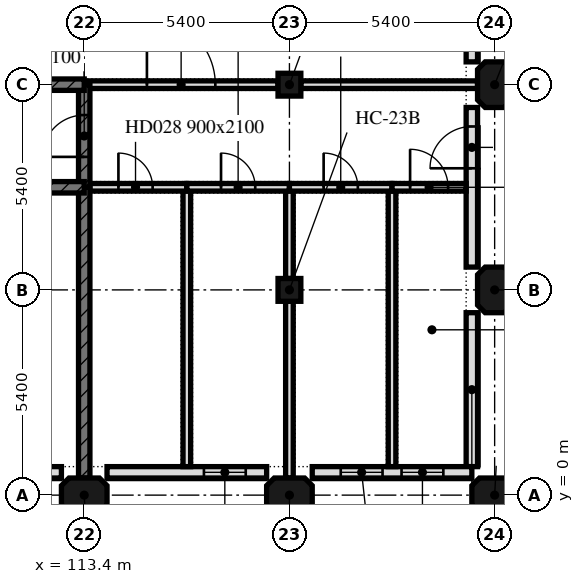
"""IFC4 building model, lengths in metres.
Left out: names, types, materials, properties, quantities, classifications, styles, units other than length and angle.
Written with IfcOpenShell. Run it as: python <this file> out.ifc"""

import sys

from ifc_helpers import new_model, si_unit, direction, frame, frame_2d, origin, origin_2d, place, context, subcontext, project, spatial, polyline, rectangle, outline, extrude, element, fill, save


model = new_model("IFC4")
c1 = context("Model", 3, precision=1e-05, world=origin(), true_north=direction((0.0, 1.0)))
c2 = subcontext(c1, "Body", "Model", "MODEL_VIEW")
j1 = project(units=[si_unit("LENGTHUNIT", "METRE"), si_unit("PLANEANGLEUNIT", "RADIAN")], contexts=[c1])
p1 = place(None, origin())
s1 = spatial("IfcSite", under=j1, at=p1, CompositionType="ELEMENT")
p2 = place(p1, origin())
s2 = spatial("IfcBuilding", under=s1, at=p2, CompositionType="ELEMENT")
p3 = place(p2, origin())
s3 = spatial("IfcBuildingStorey", under=s2, at=p3, CompositionType="ELEMENT", Elevation=0.0)
for number, where, z_axis, x_axis in (
    (1, (113.4, 0.0, -0.4), (0.0, 0.0, 1.0), (1.0, 0.0, 0.0)),
    (2, (118.8, 0.0, -0.4), (0.0, 0.0, 1.0), (1.0, 0.0, 0.0)),
):
    element("IfcColumn", number, at=place(p3, frame(where, z_axis=z_axis, x_axis=x_axis)), inside=s3, PredefinedType="COLUMN", context=c2, shape_type="SweptSolid", body=[
        extrude(outline(polyline([(-0.4, -0.45), (0.4, -0.45), (0.6, -0.25), (0.6, 0.25), (0.4, 0.45), (-0.4, 0.45), (-0.6, 0.25), (-0.6, -0.25), (-0.4, -0.45)])), origin(), (0.0, 0.0, 1.0), 8.5),
    ])
for number, where, z_axis, x_axis in (
    (3, (118.8, 5.4, -0.4), (0.0, 0.0, 1.0), (1.0, 0.0, 0.0)),
    (4, (118.8, 10.8, -0.4), (0.0, 0.0, 1.0), (1.0, 0.0, 0.0)),
):
    element("IfcColumn", number, at=place(p3, frame(where, z_axis=z_axis, x_axis=x_axis)), inside=s3, PredefinedType="COLUMN", context=c2, shape_type="SweptSolid", body=[
        extrude(rectangle(XDim=0.6, YDim=0.6, at=origin_2d()), origin(), (0.0, 0.0, 1.0), 8.5),
    ])
for number, where, z_axis, x_axis in (
    (5, (124.2, 0.0, -0.4), (0.0, 0.0, 1.0), (1.0, 0.0, 0.0)),
    (6, (124.2, 5.4, -0.4), (0.0, 0.0, 1.0), (0.0, 1.0, 0.0)),
    (7, (124.2, 10.8, -0.4), (0.0, 0.0, 1.0), (0.0, 1.0, 0.0)),
):
    element("IfcColumn", number, at=place(p3, frame(where, z_axis=z_axis, x_axis=x_axis)), inside=s3, PredefinedType="COLUMN", context=c2, shape_type="SweptSolid", body=[
        extrude(outline(polyline([(-0.4, -0.45), (0.4, -0.45), (0.6, -0.25), (0.6, 0.25), (0.4, 0.45), (-0.4, 0.45), (-0.6, 0.25), (-0.6, -0.25), (-0.4, -0.45)])), origin(), (0.0, 0.0, 1.0), 8.5),
    ])
p4 = place(p3, frame((108.6, 0.6, 0.0), z_axis=(0.0, 0.0, 1.0), x_axis=(1.0, 0.0, 0.0)))
e8 = element("IfcWall", 8, at=p4, inside=s3, PredefinedType="SOLIDWALL", context=c2, shape_type="SweptSolid", body=[
    extrude(rectangle(XDim=4.2, YDim=0.3, at=frame_2d((2.1, 0.0))), origin(), (0.0, 0.0, 1.0), 8.1),
])
p5 = place(p3, frame((114.0, 0.6, 0.0), z_axis=(0.0, 0.0, 1.0), x_axis=(1.0, 0.0, 0.0)))
e9 = element("IfcWall", 9, at=p5, inside=s3, PredefinedType="SOLIDWALL", context=c2, shape_type="SweptSolid", body=[
    extrude(rectangle(XDim=4.2, YDim=0.3, at=frame_2d((2.1, 0.0))), origin(), (0.0, 0.0, 1.0), 8.1),
])
p6 = place(p5, frame((2.55, 0.0, 0.9)))
e10 = element("IfcOpeningElement", 10, at=p6, cuts=e9, PredefinedType="OPENING", context=c2, shape_type="SweptSolid", body=[
    extrude(rectangle(XDim=1.1, YDim=1.7, at=frame_2d((0.55, 0.85))), frame((0.0, 0.15, 0.0), z_axis=(0.0, -1.0, 0.0), x_axis=(1.0, 0.0, 0.0)), (0.0, 0.0, 1.0), 0.3),
])
p7 = place(p3, frame((119.4, 0.6, 0.0), z_axis=(0.0, 0.0, 1.0), x_axis=(1.0, 0.0, 0.0)))
e11 = element("IfcWall", 11, at=p7, inside=s3, PredefinedType="SOLIDWALL", context=c2, shape_type="SweptSolid", body=[
    extrude(rectangle(XDim=4.2, YDim=0.3, at=frame_2d((2.1, 0.0))), origin(), (0.0, 0.0, 1.0), 8.1),
])
p8 = place(p7, frame((0.75, 0.0, 0.9)))
e12 = element("IfcOpeningElement", 12, at=p8, cuts=e11, PredefinedType="OPENING", context=c2, shape_type="SweptSolid", body=[
    extrude(rectangle(XDim=1.1, YDim=1.7, at=frame_2d((0.55, 0.85))), frame((0.0, 0.15, 0.0), z_axis=(0.0, -1.0, 0.0), x_axis=(1.0, 0.0, 0.0)), (0.0, 0.0, 1.0), 0.3),
])
p9 = place(p7, frame((2.35, 0.0, 0.9)))
e13 = element("IfcOpeningElement", 13, at=p9, cuts=e11, PredefinedType="OPENING", context=c2, shape_type="SweptSolid", body=[
    extrude(rectangle(XDim=1.1, YDim=1.7, at=frame_2d((0.55, 0.85))), frame((0.0, 0.15, 0.0), z_axis=(0.0, -1.0, 0.0), x_axis=(1.0, 0.0, 0.0)), (0.0, 0.0, 1.0), 0.3),
])
p10 = place(p3, frame((123.6, 0.75, 0.0), z_axis=(0.0, 0.0, 1.0), x_axis=(0.0, 1.0, 0.0)))
e14 = element("IfcWall", 14, at=p10, inside=s3, PredefinedType="SOLIDWALL", context=c2, shape_type="SweptSolid", body=[
    extrude(rectangle(XDim=4.05, YDim=0.3, at=frame_2d((2.025, 0.0))), origin(), (0.0, 0.0, 1.0), 8.1),
])
p11 = place(p3, frame((123.6, 6.0, 0.0), z_axis=(0.0, 0.0, 1.0), x_axis=(0.0, 1.0, 0.0)))
e15 = element("IfcWall", 15, at=p11, inside=s3, PredefinedType="SOLIDWALL", context=c2, shape_type="SweptSolid", body=[
    extrude(rectangle(XDim=4.2, YDim=0.3, at=frame_2d((2.1, 0.0))), origin(), (0.0, 0.0, 1.0), 8.1),
])
p12 = place(p11, frame((2.6, 0.0, 0.0)))
e16 = element("IfcOpeningElement", 16, at=p12, cuts=e15, PredefinedType="OPENING", context=c2, shape_type="SweptSolid", body=[
    extrude(rectangle(XDim=1.1, YDim=2.1, at=frame_2d((0.55, 1.05))), frame((0.0, 0.15, 0.0), z_axis=(0.0, -1.0, 0.0), x_axis=(1.0, 0.0, 0.0)), (0.0, 0.0, 1.0), 0.3),
])
p13 = place(p3, frame((123.6, 11.4, 0.0), z_axis=(0.0, 0.0, 1.0), x_axis=(0.0, 1.0, 0.0)))
e17 = element("IfcWall", 17, at=p13, inside=s3, PredefinedType="SOLIDWALL", context=c2, shape_type="SweptSolid", body=[
    extrude(rectangle(XDim=4.2, YDim=0.3, at=frame_2d((2.1, 0.0))), origin(), (0.0, 0.0, 1.0), 8.4),
])
p14 = place(p3, frame((116.1, 0.75, 0.0), z_axis=(0.0, 0.0, 1.0), x_axis=(0.0, 1.0, 0.0)))
e18 = element("IfcWall", 18, at=p14, inside=s3, PredefinedType="PARTITIONING", context=c2, shape_type="SweptSolid", body=[
    extrude(rectangle(XDim=7.35, YDim=0.2, at=frame_2d((3.675, 0.0))), origin(), (0.0, 0.0, 1.0), 8.1),
])
p15 = place(p3, frame((113.4, 8.1, 0.0), z_axis=(0.0, 0.0, 1.0), x_axis=(1.0, 0.0, 0.0)))
e19 = element("IfcWall", 19, at=p15, inside=s3, PredefinedType="PARTITIONING", context=c2, shape_type="SweptSolid", body=[
    extrude(rectangle(XDim=2.7, YDim=0.2, at=frame_2d((1.35, 0.0))), origin(), (0.0, 0.0, 1.0), 8.1),
])
p16 = place(p15, frame((0.9, 0.0, 0.0)))
e20 = element("IfcOpeningElement", 20, at=p16, cuts=e19, PredefinedType="OPENING", context=c2, shape_type="SweptSolid", body=[
    extrude(rectangle(XDim=0.9, YDim=2.1, at=frame_2d((0.45, 1.05))), frame((0.0, 0.1, 0.0), z_axis=(0.0, -1.0, 0.0), x_axis=(1.0, 0.0, 0.0)), (0.0, 0.0, 1.0), 0.2),
])
p17 = place(p3, frame((113.4, 0.45, 0.0), z_axis=(0.0, 0.0, 1.0), x_axis=(0.0, 1.0, 0.0)))
e21 = element("IfcWall", 21, at=p17, inside=s3, PredefinedType="SHEAR", context=c2, shape_type="SweptSolid", body=[
    extrude(rectangle(XDim=7.65, YDim=0.3, at=frame_2d((3.825, 0.0))), origin(), (0.0, 0.0, 1.0), 8.1),
])
p18 = place(p3, frame((118.8, 0.45, 0.0), z_axis=(0.0, 0.0, 1.0), x_axis=(0.0, 1.0, 0.0)))
e22 = element("IfcWall", 22, at=p18, inside=s3, PredefinedType="PARTITIONING", context=c2, shape_type="SweptSolid", body=[
    extrude(rectangle(XDim=4.65, YDim=0.2, at=frame_2d((2.325, 0.0))), origin(), (0.0, 0.0, 1.0), 8.1),
])
p19 = place(p3, frame((118.8, 5.7, 0.0), z_axis=(0.0, 0.0, 1.0), x_axis=(0.0, 1.0, 0.0)))
e23 = element("IfcWall", 23, at=p19, inside=s3, PredefinedType="PARTITIONING", context=c2, shape_type="SweptSolid", body=[
    extrude(rectangle(XDim=2.4, YDim=0.2, at=frame_2d((1.2, 0.0))), origin(), (0.0, 0.0, 1.0), 8.1),
])
p20 = place(p3, frame((116.1, 8.1, 0.0), z_axis=(0.0, 0.0, 1.0), x_axis=(1.0, 0.0, 0.0)))
e24 = element("IfcWall", 24, at=p20, inside=s3, PredefinedType="PARTITIONING", context=c2, shape_type="SweptSolid", body=[
    extrude(rectangle(XDim=2.7, YDim=0.2, at=frame_2d((1.35, 0.0))), origin(), (0.0, 0.0, 1.0), 8.1),
])
p21 = place(p20, frame((0.9, 0.0, 0.0)))
e25 = element("IfcOpeningElement", 25, at=p21, cuts=e24, PredefinedType="OPENING", context=c2, shape_type="SweptSolid", body=[
    extrude(rectangle(XDim=0.9, YDim=2.1, at=frame_2d((0.45, 1.05))), frame((0.0, 0.1, 0.0), z_axis=(0.0, -1.0, 0.0), x_axis=(1.0, 0.0, 0.0)), (0.0, 0.0, 1.0), 0.2),
])
p22 = place(p3, frame((121.5, 0.75, 0.0), z_axis=(0.0, 0.0, 1.0), x_axis=(0.0, 1.0, 0.0)))
e26 = element("IfcWall", 26, at=p22, inside=s3, PredefinedType="PARTITIONING", context=c2, shape_type="SweptSolid", body=[
    extrude(rectangle(XDim=7.35, YDim=0.2, at=frame_2d((3.675, 0.0))), origin(), (0.0, 0.0, 1.0), 8.1),
])
p23 = place(p3, frame((118.8, 8.1, 0.0), z_axis=(0.0, 0.0, 1.0), x_axis=(1.0, 0.0, 0.0)))
e27 = element("IfcWall", 27, at=p23, inside=s3, PredefinedType="PARTITIONING", context=c2, shape_type="SweptSolid", body=[
    extrude(rectangle(XDim=2.7, YDim=0.2, at=frame_2d((1.35, 0.0))), origin(), (0.0, 0.0, 1.0), 8.1),
])
p24 = place(p23, frame((0.9, 0.0, 0.0)))
e28 = element("IfcOpeningElement", 28, at=p24, cuts=e27, PredefinedType="OPENING", context=c2, shape_type="SweptSolid", body=[
    extrude(rectangle(XDim=0.9, YDim=2.1, at=frame_2d((0.45, 1.05))), frame((0.0, 0.1, 0.0), z_axis=(0.0, -1.0, 0.0), x_axis=(1.0, 0.0, 0.0)), (0.0, 0.0, 1.0), 0.2),
])
p25 = place(p3, frame((121.5, 8.1, 0.0), z_axis=(0.0, 0.0, 1.0), x_axis=(1.0, 0.0, 0.0)))
e29 = element("IfcWall", 29, at=p25, inside=s3, PredefinedType="PARTITIONING", context=c2, shape_type="SweptSolid", body=[
    extrude(rectangle(XDim=1.95, YDim=0.2, at=frame_2d((0.975, 0.0))), origin(), (0.0, 0.0, 1.0), 8.1),
])
p26 = place(p25, frame((0.475, 0.0, 0.0)))
e30 = element("IfcOpeningElement", 30, at=p26, cuts=e29, PredefinedType="OPENING", context=c2, shape_type="SweptSolid", body=[
    extrude(rectangle(XDim=1.0, YDim=2.1, at=frame_2d((0.5, 1.05))), frame((0.0, 0.1, 0.0), z_axis=(0.0, -1.0, 0.0), x_axis=(1.0, 0.0, 0.0)), (0.0, 0.0, 1.0), 0.2),
])
p27 = place(p3, frame((113.4, 10.8, 0.0), z_axis=(0.0, 0.0, 1.0), x_axis=(1.0, 0.0, 0.0)))
e31 = element("IfcWall", 31, at=p27, inside=s3, PredefinedType="PARTITIONING", context=c2, shape_type="SweptSolid", body=[
    extrude(rectangle(XDim=5.1, YDim=0.2, at=frame_2d((2.55, 0.0))), origin(), (0.0, 0.0, 1.0), 8.1),
])
p28 = place(p27, frame((1.65, 0.0, 0.0)))
e32 = element("IfcOpeningElement", 32, at=p28, cuts=e31, PredefinedType="OPENING", context=c2, shape_type="SweptSolid", body=[
    extrude(rectangle(XDim=1.8, YDim=2.4, at=frame_2d((0.9, 1.2))), frame((0.0, 0.1, 0.0), z_axis=(0.0, -1.0, 0.0), x_axis=(1.0, 0.0, 0.0)), (0.0, 0.0, 1.0), 0.2),
])
p29 = place(p3, frame((119.1, 10.8, 0.0), z_axis=(0.0, 0.0, 1.0), x_axis=(1.0, 0.0, 0.0)))
e33 = element("IfcWall", 33, at=p29, inside=s3, PredefinedType="PARTITIONING", context=c2, shape_type="SweptSolid", body=[
    extrude(rectangle(XDim=4.65, YDim=0.2, at=frame_2d((2.325, 0.0))), origin(), (0.0, 0.0, 1.0), 8.1),
])
p30 = place(p3, frame((113.4, 8.1, 0.0), z_axis=(0.0, 0.0, 1.0), x_axis=(0.0, 1.0, 0.0)))
e34 = element("IfcWall", 34, at=p30, inside=s3, PredefinedType="SHEAR", context=c2, shape_type="SweptSolid", body=[
    extrude(rectangle(XDim=2.7, YDim=0.3, at=frame_2d((1.35, 0.0))), origin(), (0.0, 0.0, 1.0), 8.1),
])
p31 = place(p30, frame((0.8, 0.0, 0.0)))
e35 = element("IfcOpeningElement", 35, at=p31, cuts=e34, PredefinedType="OPENING", context=c2, shape_type="SweptSolid", body=[
    extrude(rectangle(XDim=1.1, YDim=2.1, at=frame_2d((0.55, 1.05))), frame((0.0, 0.15, 0.0), z_axis=(0.0, -1.0, 0.0), x_axis=(1.0, 0.0, 0.0)), (0.0, 0.0, 1.0), 0.3),
])
p32 = place(p3, frame((102.6, 10.8, 0.0), z_axis=(0.0, 0.0, 1.0), x_axis=(1.0, 0.0, 0.0)))
e36 = element("IfcWall", 36, at=p32, inside=s3, PredefinedType="SHEAR", context=c2, shape_type="SweptSolid", body=[
    extrude(rectangle(XDim=10.8, YDim=0.3, at=frame_2d((5.4, 0.0))), origin(), (0.0, 0.0, 1.0), 8.1),
])
p33 = place(p3, frame((112.1, 8.1, 0.0), z_axis=(0.0, 0.0, 1.0), x_axis=(1.0, 0.0, 0.0)))
e37 = element("IfcWall", 37, at=p33, inside=s3, PredefinedType="SHEAR", context=c2, shape_type="SweptSolid", body=[
    extrude(rectangle(XDim=1.3, YDim=0.3, at=frame_2d((0.65, 0.0))), origin(), (0.0, 0.0, 1.0), 8.1),
])
p34 = place(p6, origin())
e38 = element("IfcWindow", 38, at=p34, inside=s3, PartitioningType="SINGLE_PANEL", PredefinedType="WINDOW", context=c2, shape_type="SweptSolid", body=[
    extrude(rectangle(XDim=1.1, YDim=1.7, at=frame_2d((0.55, 0.85))), frame((0.0, 0.03, 0.0), z_axis=(0.0, -1.0, 0.0), x_axis=(1.0, 0.0, 0.0)), (0.0, 0.0, 1.0), 0.06),
])
fill(e10, e38)
p35 = place(p8, origin())
e39 = element("IfcWindow", 39, at=p35, inside=s3, PartitioningType="SINGLE_PANEL", PredefinedType="WINDOW", context=c2, shape_type="SweptSolid", body=[
    extrude(rectangle(XDim=1.1, YDim=1.7, at=frame_2d((0.55, 0.85))), frame((0.0, 0.03, 0.0), z_axis=(0.0, -1.0, 0.0), x_axis=(1.0, 0.0, 0.0)), (0.0, 0.0, 1.0), 0.06),
])
fill(e12, e39)
p36 = place(p9, origin())
e40 = element("IfcWindow", 40, at=p36, inside=s3, PartitioningType="SINGLE_PANEL", PredefinedType="WINDOW", context=c2, shape_type="SweptSolid", body=[
    extrude(rectangle(XDim=1.1, YDim=1.7, at=frame_2d((0.55, 0.85))), frame((0.0, 0.03, 0.0), z_axis=(0.0, -1.0, 0.0), x_axis=(1.0, 0.0, 0.0)), (0.0, 0.0, 1.0), 0.06),
])
fill(e13, e40)
p37 = place(p12, origin())
e41 = element("IfcDoor", 41, at=p37, inside=s3, OperationType="SINGLE_SWING_LEFT", PredefinedType="DOOR", context=c2, shape_type="SweptSolid", body=[
    extrude(rectangle(XDim=1.1, YDim=2.1, at=frame_2d((0.55, 1.05))), frame((0.0, 0.025, 0.0), z_axis=(0.0, -1.0, 0.0), x_axis=(1.0, 0.0, 0.0)), (0.0, 0.0, 1.0), 0.05),
])
fill(e16, e41)
p38 = place(p16, origin())
e42 = element("IfcDoor", 42, at=p38, inside=s3, OperationType="SINGLE_SWING_LEFT", PredefinedType="DOOR", context=c2, shape_type="SweptSolid", body=[
    extrude(rectangle(XDim=0.9, YDim=2.1, at=frame_2d((0.45, 1.05))), frame((0.0, 0.025, 0.0), z_axis=(0.0, -1.0, 0.0), x_axis=(1.0, 0.0, 0.0)), (0.0, 0.0, 1.0), 0.05),
])
fill(e20, e42)
p39 = place(p21, origin())
e43 = element("IfcDoor", 43, at=p39, inside=s3, OperationType="SINGLE_SWING_LEFT", PredefinedType="DOOR", context=c2, shape_type="SweptSolid", body=[
    extrude(rectangle(XDim=0.9, YDim=2.1, at=frame_2d((0.45, 1.05))), frame((0.0, 0.025, 0.0), z_axis=(0.0, -1.0, 0.0), x_axis=(1.0, 0.0, 0.0)), (0.0, 0.0, 1.0), 0.05),
])
fill(e25, e43)
p40 = place(p24, origin())
e44 = element("IfcDoor", 44, at=p40, inside=s3, OperationType="SINGLE_SWING_LEFT", PredefinedType="DOOR", context=c2, shape_type="SweptSolid", body=[
    extrude(rectangle(XDim=0.9, YDim=2.1, at=frame_2d((0.45, 1.05))), frame((0.0, 0.025, 0.0), z_axis=(0.0, -1.0, 0.0), x_axis=(1.0, 0.0, 0.0)), (0.0, 0.0, 1.0), 0.05),
])
fill(e28, e44)
p41 = place(p26, origin())
e45 = element("IfcDoor", 45, at=p41, inside=s3, OperationType="SINGLE_SWING_LEFT", PredefinedType="DOOR", context=c2, shape_type="SweptSolid", body=[
    extrude(rectangle(XDim=1.0, YDim=2.1, at=frame_2d((0.5, 1.05))), frame((0.0, 0.025, 0.0), z_axis=(0.0, -1.0, 0.0), x_axis=(1.0, 0.0, 0.0)), (0.0, 0.0, 1.0), 0.05),
])
fill(e30, e45)
p42 = place(p31, origin())
e46 = element("IfcDoor", 46, at=p42, inside=s3, OperationType="SINGLE_SWING_LEFT", PredefinedType="DOOR", context=c2, shape_type="SweptSolid", body=[
    extrude(rectangle(XDim=1.1, YDim=2.1, at=frame_2d((0.55, 1.05))), frame((0.0, 0.025, 0.0), z_axis=(0.0, -1.0, 0.0), x_axis=(1.0, 0.0, 0.0)), (0.0, 0.0, 1.0), 0.05),
])
fill(e35, e46)
p43 = place(p28, origin())
e47 = element("IfcDoor", 47, at=p43, inside=s3, OperationType="DOUBLE_DOOR_SINGLE_SWING", PredefinedType="DOOR", context=c2, shape_type="SweptSolid", body=[
    extrude(rectangle(XDim=1.8, YDim=2.4, at=frame_2d((0.9, 1.2))), frame((0.0, 0.025, 0.0), z_axis=(0.0, -1.0, 0.0), x_axis=(1.0, 0.0, 0.0)), (0.0, 0.0, 1.0), 0.05),
])
fill(e32, e47)
save(model, sys.argv[1])
